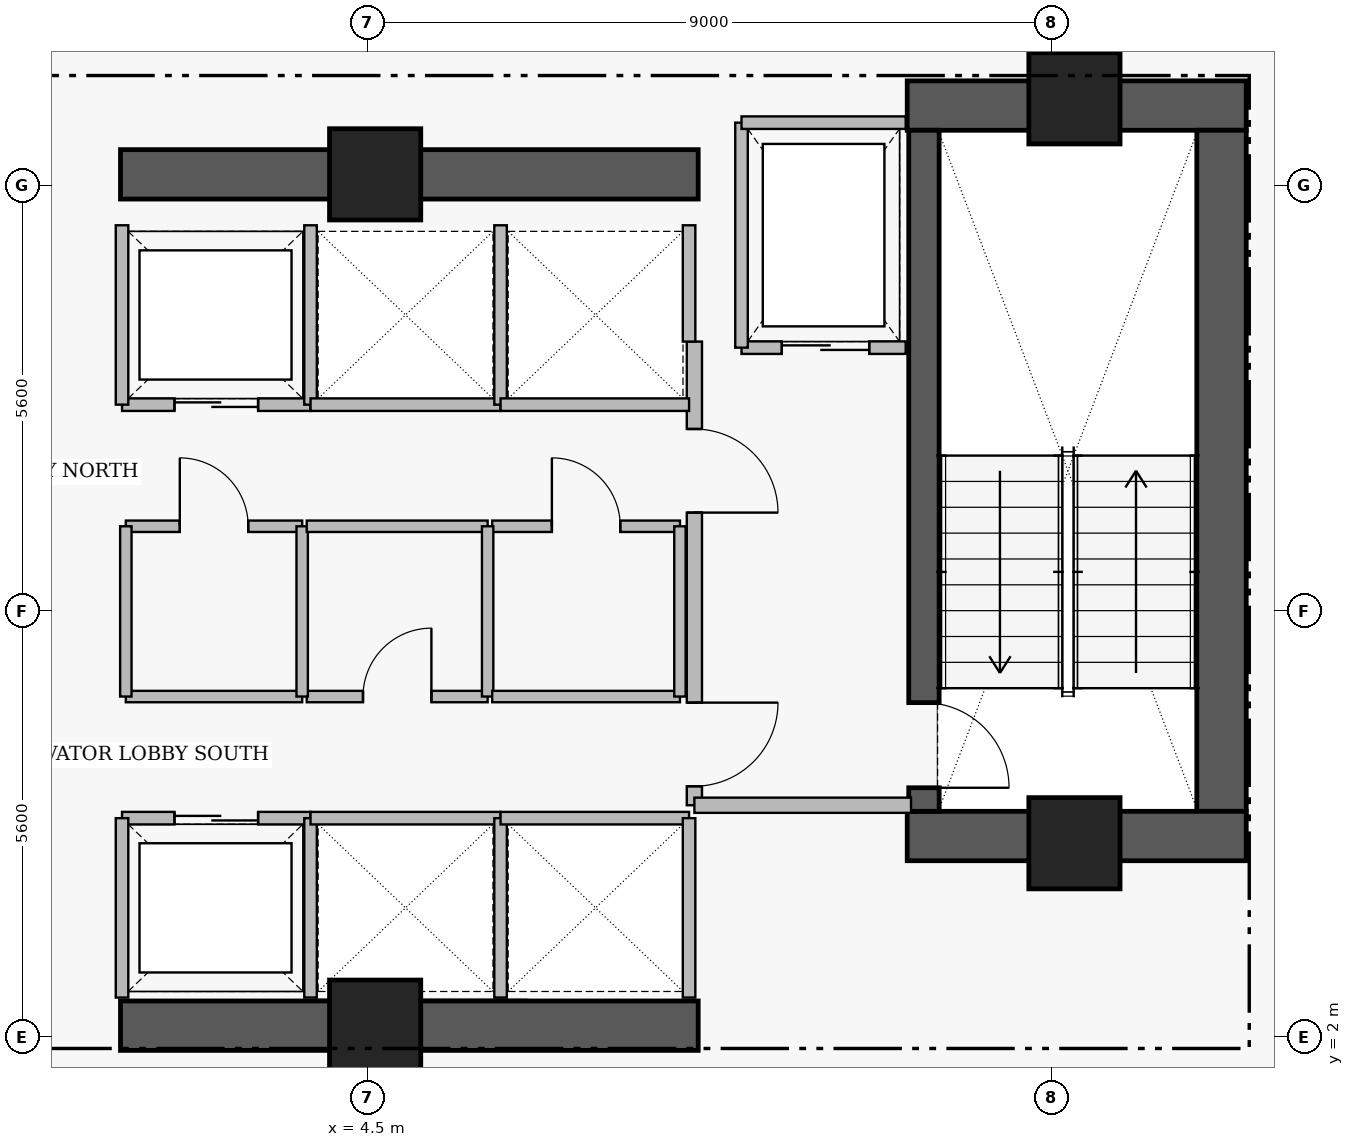
"""IFC4 building model, lengths in metres.
Left out: names, types, materials, properties, quantities, classifications, styles, units other than length and angle.
Written with IfcOpenShell. Run it as: python <this file> out.ifc"""

import sys

from ifc_helpers import new_model, si_unit, direction, frame, frame_2d, origin, origin_2d, place, context, subcontext, project, spatial, rectangle, extrude, element, fill, save


model = new_model("IFC4")
c1 = context("Model", 3, precision=1e-05, world=origin(), true_north=direction((0.0, 1.0)))
c2 = subcontext(c1, "Body", "Model", "MODEL_VIEW")
j1 = project(units=[si_unit("LENGTHUNIT", "METRE"), si_unit("PLANEANGLEUNIT", "RADIAN")], contexts=[c1])
p1 = place(None, origin())
s1 = spatial("IfcSite", under=j1, at=p1, CompositionType="ELEMENT")
p2 = place(p1, origin())
s2 = spatial("IfcBuilding", under=s1, at=p2, CompositionType="ELEMENT")
p3 = place(p2, frame((0.0, 0.0, 177.4)))
s3 = spatial("IfcBuildingStorey", under=s2, at=p3, CompositionType="ELEMENT", Elevation=177.4)
p4 = place(p3, frame((11.6, 14.255, 0.0), z_axis=(0.0, 0.0, 1.0), x_axis=(1.0, 0.0, 0.0)))
e1 = element("IfcWall", 1, at=p4, inside=s3, PredefinedType="SHEAR", context=c2, shape_type="SweptSolid", body=[
    extrude(rectangle(XDim=4.46, YDim=0.65, at=frame_2d((2.23, 0.0))), origin(), (0.0, 0.0, 1.0), 3.56),
])
p5 = place(p3, frame((15.735, 4.97, 0.0), z_axis=(0.0, 0.0, 1.0), x_axis=(0.0, 1.0, 0.0)))
e2 = element("IfcWall", 2, at=p5, inside=s3, PredefinedType="SHEAR", context=c2, shape_type="SweptSolid", body=[
    extrude(rectangle(XDim=8.96, YDim=0.65, at=frame_2d((4.48, 0.0))), origin(), (0.0, 0.0, 1.0), 3.56),
])
p6 = place(p3, frame((11.6, 4.645, 0.0), z_axis=(0.0, 0.0, 1.0), x_axis=(1.0, 0.0, 0.0)))
e3 = element("IfcWall", 3, at=p6, inside=s3, PredefinedType="SHEAR", context=c2, shape_type="SweptSolid", body=[
    extrude(rectangle(XDim=4.46, YDim=0.65, at=frame_2d((2.23, 0.0))), origin(), (0.0, 0.0, 1.0), 3.56),
])
for number, where, z_axis, x_axis in (
    (4, (1.25, 2.15, 0.0), (0.0, 0.0, 1.0), (1.0, 0.0, 0.0)),
    (5, (1.25, 13.35, 0.0), (0.0, 0.0, 1.0), (1.0, 0.0, 0.0)),
):
    element("IfcWall", number, at=place(p3, frame(where, z_axis=z_axis, x_axis=x_axis)), inside=s3, PredefinedType="SHEAR", context=c2, shape_type="SweptSolid", body=[
        extrude(rectangle(XDim=7.6, YDim=0.65, at=frame_2d((3.8, 0.0))), origin(), (0.0, 0.0, 1.0), 3.53),
    ])
p7 = place(p3, frame((11.82, 13.93, 0.0), z_axis=(0.0, 0.0, 1.0), x_axis=(0.0, -1.0, 0.0)))
e6 = element("IfcWall", 6, at=p7, inside=s3, PredefinedType="SHEAR", context=c2, shape_type="SweptSolid", body=[
    extrude(rectangle(XDim=8.96, YDim=0.4, at=frame_2d((4.48, 0.0))), origin(), (0.0, 0.0, 1.0), 3.56),
])
p8 = place(p7, frame((7.53, 0.0, 0.0)))
e7 = element("IfcOpeningElement", 7, at=p8, cuts=e6, PredefinedType="OPENING", context=c2, shape_type="SweptSolid", body=[
    extrude(rectangle(XDim=1.12, YDim=2.22, at=frame_2d((0.56, 1.11))), frame((0.0, 0.21, 0.0), z_axis=(0.0, -1.0, 0.0), x_axis=(1.0, 0.0, 0.0)), (0.0, 0.0, 1.0), 0.42),
])
for number, where, z_axis, x_axis in (
    (8, (4.6, 13.35, 0.0), (0.0, 0.0, 1.0), (1.0, 0.0, 0.0)),
    (9, (13.8, 14.35, 0.0), (0.0, 0.0, 1.0), (1.0, 0.0, 0.0)),
    (10, (4.6, 2.15, 0.0), (0.0, 0.0, 1.0), (1.0, 0.0, 0.0)),
    (11, (13.8, 4.55, 0.0), (0.0, 0.0, 1.0), (1.0, 0.0, 0.0)),
):
    element("IfcColumn", number, at=place(p3, frame(where, z_axis=z_axis, x_axis=x_axis)), inside=s3, PredefinedType="COLUMN", context=c2, shape_type="SweptSolid", body=[
        extrude(rectangle(XDim=1.2, YDim=1.2, at=origin_2d()), origin(), (0.0, 0.0, 1.0), 3.75),
    ])
p9 = place(p3, frame((8.8, 11.15, 0.0), z_axis=(0.0, 0.0, 1.0), x_axis=(0.0, -1.0, 0.0)))
e12 = element("IfcWall", 12, at=p9, inside=s3, PredefinedType="PARTITIONING", context=c2, shape_type="SweptSolid", body=[
    extrude(rectangle(XDim=6.1, YDim=0.2, at=frame_2d((3.05, 0.0))), origin(), (0.0, 0.0, 1.0), 3.53),
])
p10 = place(p9, frame((1.15, 0.0, 0.0)))
e13 = element("IfcOpeningElement", 13, at=p10, cuts=e12, PredefinedType="OPENING", context=c2, shape_type="SweptSolid", body=[
    extrude(rectangle(XDim=1.1, YDim=2.2, at=frame_2d((0.55, 1.1))), frame((0.0, 0.11, 0.0), z_axis=(0.0, -1.0, 0.0), x_axis=(1.0, 0.0, 0.0)), (0.0, 0.0, 1.0), 0.22),
])
p11 = place(p9, frame((4.75, 0.0, 0.0)))
e14 = element("IfcOpeningElement", 14, at=p11, cuts=e12, PredefinedType="OPENING", context=c2, shape_type="SweptSolid", body=[
    extrude(rectangle(XDim=1.1, YDim=2.2, at=frame_2d((0.55, 1.1))), frame((0.0, 0.11, 0.0), z_axis=(0.0, -1.0, 0.0), x_axis=(1.0, 0.0, 0.0)), (0.0, 0.0, 1.0), 0.22),
])
p12 = place(p3, frame((9.42, 11.07, 0.0), z_axis=(0.0, 0.0, 1.0), x_axis=(1.0, 0.0, 0.0)))
e15 = element("IfcWall", 15, at=p12, inside=s3, PredefinedType="PARTITIONING", context=c2, shape_type="SweptSolid", body=[
    extrude(rectangle(XDim=2.16, YDim=0.165, at=frame_2d((1.08, 0.0))), origin(), (0.0, 0.0, 1.0), 3.53),
])
p13 = place(p12, frame((0.53, 0.0, 0.0)))
e16 = element("IfcOpeningElement", 16, at=p13, cuts=e15, PredefinedType="OPENING", context=c2, shape_type="SweptSolid", body=[
    extrude(rectangle(XDim=1.15, YDim=2.25, at=frame_2d((0.575, 1.125))), frame((0.0, 0.093, 0.0), z_axis=(0.0, -1.0, 0.0), x_axis=(1.0, 0.0, 0.0)), (0.0, 0.0, 1.0), 0.185),
])
p14 = place(p3, frame((1.27, 4.88, 0.0), z_axis=(0.0, 0.0, 1.0), x_axis=(1.0, 0.0, 0.0)))
e17 = element("IfcWall", 17, at=p14, inside=s3, PredefinedType="PARTITIONING", context=c2, shape_type="SweptSolid", body=[
    extrude(rectangle(XDim=2.48, YDim=0.165, at=frame_2d((1.24, 0.0))), origin(), (0.0, 0.0, 1.0), 3.53),
])
p15 = place(p14, frame((0.69, 0.0, 0.0)))
e18 = element("IfcOpeningElement", 18, at=p15, cuts=e17, PredefinedType="OPENING", context=c2, shape_type="SweptSolid", body=[
    extrude(rectangle(XDim=1.1, YDim=2.25, at=frame_2d((0.55, 1.125))), frame((0.0, 0.093, 0.0), z_axis=(0.0, -1.0, 0.0), x_axis=(1.0, 0.0, 0.0)), (0.0, 0.0, 1.0), 0.185),
])
p16 = place(p3, frame((1.27, 10.32, 0.0), z_axis=(0.0, 0.0, 1.0), x_axis=(1.0, 0.0, 0.0)))
e19 = element("IfcWall", 19, at=p16, inside=s3, PredefinedType="PARTITIONING", context=c2, shape_type="SweptSolid", body=[
    extrude(rectangle(XDim=2.48, YDim=0.165, at=frame_2d((1.24, 0.0))), origin(), (0.0, 0.0, 1.0), 3.53),
])
p17 = place(p16, frame((0.69, 0.0, 0.0)))
e20 = element("IfcOpeningElement", 20, at=p17, cuts=e19, PredefinedType="OPENING", context=c2, shape_type="SweptSolid", body=[
    extrude(rectangle(XDim=1.1, YDim=2.25, at=frame_2d((0.55, 1.125))), frame((0.0, 0.093, 0.0), z_axis=(0.0, -1.0, 0.0), x_axis=(1.0, 0.0, 0.0)), (0.0, 0.0, 1.0), 0.185),
])
p18 = place(p3, frame((1.32, 8.72, 0.0), z_axis=(0.0, 0.0, 1.0), x_axis=(1.0, 0.0, 0.0)))
e21 = element("IfcWall", 21, at=p18, inside=s3, PredefinedType="PARTITIONING", context=c2, shape_type="SweptSolid", body=[
    extrude(rectangle(XDim=2.32, YDim=0.15, at=frame_2d((1.16, 0.0))), origin(), (0.0, 0.0, 1.0), 3.53),
])
p19 = place(p18, frame((0.71, 0.0, 0.0)))
e22 = element("IfcOpeningElement", 22, at=p19, cuts=e21, PredefinedType="OPENING", context=c2, shape_type="SweptSolid", body=[
    extrude(rectangle(XDim=0.9, YDim=2.15, at=frame_2d((0.45, 1.075))), frame((0.0, 0.085, 0.0), z_axis=(0.0, -1.0, 0.0), x_axis=(1.0, 0.0, 0.0)), (0.0, 0.0, 1.0), 0.17),
])
p20 = place(p3, frame((3.7, 6.48, 0.0), z_axis=(0.0, 0.0, 1.0), x_axis=(1.0, 0.0, 0.0)))
e23 = element("IfcWall", 23, at=p20, inside=s3, PredefinedType="PARTITIONING", context=c2, shape_type="SweptSolid", body=[
    extrude(rectangle(XDim=2.38, YDim=0.15, at=frame_2d((1.19, 0.0))), origin(), (0.0, 0.0, 1.0), 3.53),
])
p21 = place(p20, frame((0.74, 0.0, 0.0)))
e24 = element("IfcOpeningElement", 24, at=p21, cuts=e23, PredefinedType="OPENING", context=c2, shape_type="SweptSolid", body=[
    extrude(rectangle(XDim=0.9, YDim=2.15, at=frame_2d((0.45, 1.075))), frame((0.0, 0.085, 0.0), z_axis=(0.0, -1.0, 0.0), x_axis=(1.0, 0.0, 0.0)), (0.0, 0.0, 1.0), 0.17),
])
p22 = place(p3, frame((6.14, 8.72, 0.0), z_axis=(0.0, 0.0, 1.0), x_axis=(1.0, 0.0, 0.0)))
e25 = element("IfcWall", 25, at=p22, inside=s3, PredefinedType="PARTITIONING", context=c2, shape_type="SweptSolid", body=[
    extrude(rectangle(XDim=2.47, YDim=0.15, at=frame_2d((1.235, 0.0))), origin(), (0.0, 0.0, 1.0), 3.53),
])
p23 = place(p22, frame((0.785, 0.0, 0.0)))
e26 = element("IfcOpeningElement", 26, at=p23, cuts=e25, PredefinedType="OPENING", context=c2, shape_type="SweptSolid", body=[
    extrude(rectangle(XDim=0.9, YDim=2.15, at=frame_2d((0.45, 1.075))), frame((0.0, 0.085, 0.0), z_axis=(0.0, -1.0, 0.0), x_axis=(1.0, 0.0, 0.0)), (0.0, 0.0, 1.0), 0.17),
])
p24 = place(p3, frame((8.8, 5.05, 0.0), z_axis=(0.0, 0.0, 1.0), x_axis=(1.0, 0.0, 0.0)))
e27 = element("IfcWall", 27, at=p24, inside=s3, PredefinedType="PARTITIONING", context=c2, shape_type="SweptSolid", body=[
    extrude(rectangle(XDim=2.85, YDim=0.2, at=frame_2d((1.425, 0.0))), origin(), (0.0, 0.0, 1.0), 3.53),
])
p25 = place(p3, frame((9.42, 11.07, 0.0), z_axis=(0.0, 0.0, 1.0), x_axis=(0.0, 1.0, 0.0)))
e28 = element("IfcWall", 28, at=p25, inside=s3, PredefinedType="PARTITIONING", context=c2, shape_type="SweptSolid", body=[
    extrude(rectangle(XDim=2.96, YDim=0.165, at=frame_2d((1.48, 0.0))), origin(), (0.0, 0.0, 1.0), 3.53),
])
p26 = place(p3, frame((9.42, 14.03, 0.0), z_axis=(0.0, 0.0, 1.0), x_axis=(1.0, 0.0, 0.0)))
e29 = element("IfcWall", 29, at=p26, inside=s3, PredefinedType="PARTITIONING", context=c2, shape_type="SweptSolid", body=[
    extrude(rectangle(XDim=2.16, YDim=0.165, at=frame_2d((1.08, 0.0))), origin(), (0.0, 0.0, 1.0), 3.53),
])
for number, where, z_axis, x_axis in (
    (30, (1.27, 2.52, 0.0), (0.0, 0.0, 1.0), (0.0, 1.0, 0.0)),
    (31, (3.75, 2.52, 0.0), (0.0, 0.0, 1.0), (0.0, 1.0, 0.0)),
    (32, (1.27, 10.32, 0.0), (0.0, 0.0, 1.0), (0.0, 1.0, 0.0)),
    (33, (3.75, 10.32, 0.0), (0.0, 0.0, 1.0), (0.0, 1.0, 0.0)),
):
    element("IfcWall", number, at=place(p3, frame(where, z_axis=z_axis, x_axis=x_axis)), inside=s3, PredefinedType="PARTITIONING", context=c2, shape_type="SweptSolid", body=[
        extrude(rectangle(XDim=2.36, YDim=0.165, at=frame_2d((1.18, 0.0))), origin(), (0.0, 0.0, 1.0), 3.53),
    ])
p27 = place(p3, frame((3.75, 4.88, 0.0), z_axis=(0.0, 0.0, 1.0), x_axis=(1.0, 0.0, 0.0)))
e34 = element("IfcWall", 34, at=p27, inside=s3, PredefinedType="PARTITIONING", context=c2, shape_type="SweptSolid", body=[
    extrude(rectangle(XDim=2.5, YDim=0.165, at=frame_2d((1.25, 0.0))), origin(), (0.0, 0.0, 1.0), 3.53),
])
p28 = place(p3, frame((6.25, 2.52, 0.0), z_axis=(0.0, 0.0, 1.0), x_axis=(0.0, 1.0, 0.0)))
e35 = element("IfcWall", 35, at=p28, inside=s3, PredefinedType="PARTITIONING", context=c2, shape_type="SweptSolid", body=[
    extrude(rectangle(XDim=2.36, YDim=0.165, at=frame_2d((1.18, 0.0))), origin(), (0.0, 0.0, 1.0), 3.53),
])
p29 = place(p3, frame((6.25, 4.88, 0.0), z_axis=(0.0, 0.0, 1.0), x_axis=(1.0, 0.0, 0.0)))
e36 = element("IfcWall", 36, at=p29, inside=s3, PredefinedType="PARTITIONING", context=c2, shape_type="SweptSolid", body=[
    extrude(rectangle(XDim=2.48, YDim=0.165, at=frame_2d((1.24, 0.0))), origin(), (0.0, 0.0, 1.0), 3.53),
])
p30 = place(p3, frame((8.73, 2.52, 0.0), z_axis=(0.0, 0.0, 1.0), x_axis=(0.0, 1.0, 0.0)))
e37 = element("IfcWall", 37, at=p30, inside=s3, PredefinedType="PARTITIONING", context=c2, shape_type="SweptSolid", body=[
    extrude(rectangle(XDim=2.36, YDim=0.165, at=frame_2d((1.18, 0.0))), origin(), (0.0, 0.0, 1.0), 3.53),
])
p31 = place(p3, frame((3.75, 10.32, 0.0), z_axis=(0.0, 0.0, 1.0), x_axis=(1.0, 0.0, 0.0)))
e38 = element("IfcWall", 38, at=p31, inside=s3, PredefinedType="PARTITIONING", context=c2, shape_type="SweptSolid", body=[
    extrude(rectangle(XDim=2.5, YDim=0.165, at=frame_2d((1.25, 0.0))), origin(), (0.0, 0.0, 1.0), 3.53),
])
p32 = place(p3, frame((6.25, 10.32, 0.0), z_axis=(0.0, 0.0, 1.0), x_axis=(0.0, 1.0, 0.0)))
e39 = element("IfcWall", 39, at=p32, inside=s3, PredefinedType="PARTITIONING", context=c2, shape_type="SweptSolid", body=[
    extrude(rectangle(XDim=2.36, YDim=0.165, at=frame_2d((1.18, 0.0))), origin(), (0.0, 0.0, 1.0), 3.53),
])
p33 = place(p3, frame((6.25, 10.32, 0.0), z_axis=(0.0, 0.0, 1.0), x_axis=(1.0, 0.0, 0.0)))
e40 = element("IfcWall", 40, at=p33, inside=s3, PredefinedType="PARTITIONING", context=c2, shape_type="SweptSolid", body=[
    extrude(rectangle(XDim=2.48, YDim=0.165, at=frame_2d((1.24, 0.0))), origin(), (0.0, 0.0, 1.0), 3.53),
])
p34 = place(p3, frame((8.73, 11.15, 0.0), z_axis=(0.0, 0.0, 1.0), x_axis=(0.0, 1.0, 0.0)))
e41 = element("IfcWall", 41, at=p34, inside=s3, PredefinedType="PARTITIONING", context=c2, shape_type="SweptSolid", body=[
    extrude(rectangle(XDim=1.53, YDim=0.165, at=frame_2d((0.765, 0.0))), origin(), (0.0, 0.0, 1.0), 3.53),
])
p35 = place(p3, frame((1.32, 6.48, 0.0), z_axis=(0.0, 0.0, 1.0), x_axis=(1.0, 0.0, 0.0)))
e42 = element("IfcWall", 42, at=p35, inside=s3, PredefinedType="PARTITIONING", context=c2, shape_type="SweptSolid", body=[
    extrude(rectangle(XDim=2.32, YDim=0.15, at=frame_2d((1.16, 0.0))), origin(), (0.0, 0.0, 1.0), 3.53),
])
for number, where, z_axis, x_axis in (
    (43, (1.32, 6.48, 0.0), (0.0, 0.0, 1.0), (0.0, 1.0, 0.0)),
    (44, (3.64, 6.48, 0.0), (0.0, 0.0, 1.0), (0.0, 1.0, 0.0)),
):
    element("IfcWall", number, at=place(p3, frame(where, z_axis=z_axis, x_axis=x_axis)), inside=s3, PredefinedType="PARTITIONING", context=c2, shape_type="SweptSolid", body=[
        extrude(rectangle(XDim=2.24, YDim=0.15, at=frame_2d((1.12, 0.0))), origin(), (0.0, 0.0, 1.0), 3.53),
    ])
p36 = place(p3, frame((3.7, 8.72, 0.0), z_axis=(0.0, 0.0, 1.0), x_axis=(1.0, 0.0, 0.0)))
e45 = element("IfcWall", 45, at=p36, inside=s3, PredefinedType="PARTITIONING", context=c2, shape_type="SweptSolid", body=[
    extrude(rectangle(XDim=2.38, YDim=0.15, at=frame_2d((1.19, 0.0))), origin(), (0.0, 0.0, 1.0), 3.53),
])
p37 = place(p3, frame((6.08, 6.48, 0.0), z_axis=(0.0, 0.0, 1.0), x_axis=(0.0, 1.0, 0.0)))
e46 = element("IfcWall", 46, at=p37, inside=s3, PredefinedType="PARTITIONING", context=c2, shape_type="SweptSolid", body=[
    extrude(rectangle(XDim=2.24, YDim=0.15, at=frame_2d((1.12, 0.0))), origin(), (0.0, 0.0, 1.0), 3.53),
])
p38 = place(p3, frame((6.14, 6.48, 0.0), z_axis=(0.0, 0.0, 1.0), x_axis=(1.0, 0.0, 0.0)))
e47 = element("IfcWall", 47, at=p38, inside=s3, PredefinedType="PARTITIONING", context=c2, shape_type="SweptSolid", body=[
    extrude(rectangle(XDim=2.47, YDim=0.15, at=frame_2d((1.235, 0.0))), origin(), (0.0, 0.0, 1.0), 3.53),
])
p39 = place(p3, frame((8.61, 6.48, 0.0), z_axis=(0.0, 0.0, 1.0), x_axis=(0.0, 1.0, 0.0)))
e48 = element("IfcWall", 48, at=p39, inside=s3, PredefinedType="PARTITIONING", context=c2, shape_type="SweptSolid", body=[
    extrude(rectangle(XDim=2.24, YDim=0.15, at=frame_2d((1.12, 0.0))), origin(), (0.0, 0.0, 1.0), 3.53),
])
p40 = place(p8, origin())
e49 = element("IfcDoor", 49, at=p40, inside=s3, OperationType="SINGLE_SWING_RIGHT", PredefinedType="DOOR", context=c2, shape_type="SweptSolid", body=[
    extrude(rectangle(XDim=1.12, YDim=2.22, at=frame_2d((0.56, 1.11))), frame((0.0, 0.025, 0.0), z_axis=(0.0, -1.0, 0.0), x_axis=(1.0, 0.0, 0.0)), (0.0, 0.0, 1.0), 0.05),
])
fill(e7, e49)
p41 = place(p10, origin())
e50 = element("IfcDoor", 50, at=p41, inside=s3, OperationType="SINGLE_SWING_RIGHT", PredefinedType="DOOR", context=c2, shape_type="SweptSolid", body=[
    extrude(rectangle(XDim=1.1, YDim=2.2, at=frame_2d((0.55, 1.1))), frame((0.0, 0.025, 0.0), z_axis=(0.0, -1.0, 0.0), x_axis=(1.0, 0.0, 0.0)), (0.0, 0.0, 1.0), 0.05),
])
fill(e13, e50)
p42 = place(p11, origin())
e51 = element("IfcDoor", 51, at=p42, inside=s3, OperationType="SINGLE_SWING_LEFT", PredefinedType="DOOR", context=c2, shape_type="SweptSolid", body=[
    extrude(rectangle(XDim=1.1, YDim=2.2, at=frame_2d((0.55, 1.1))), frame((0.0, 0.025, 0.0), z_axis=(0.0, -1.0, 0.0), x_axis=(1.0, 0.0, 0.0)), (0.0, 0.0, 1.0), 0.05),
])
fill(e14, e51)
p43 = place(p13, origin())
e52 = element("IfcDoor", 52, at=p43, inside=s3, OperationType="SLIDING_TO_LEFT", PredefinedType="DOOR", context=c2, shape_type="SweptSolid", body=[
    extrude(rectangle(XDim=1.15, YDim=2.25, at=frame_2d((0.575, 1.125))), frame((0.0, 0.025, 0.0), z_axis=(0.0, -1.0, 0.0), x_axis=(1.0, 0.0, 0.0)), (0.0, 0.0, 1.0), 0.05),
])
fill(e16, e52)
p44 = place(p15, origin())
e53 = element("IfcDoor", 53, at=p44, inside=s3, OperationType="SLIDING_TO_LEFT", PredefinedType="DOOR", context=c2, shape_type="SweptSolid", body=[
    extrude(rectangle(XDim=1.1, YDim=2.25, at=frame_2d((0.55, 1.125))), frame((0.0, 0.025, 0.0), z_axis=(0.0, -1.0, 0.0), x_axis=(1.0, 0.0, 0.0)), (0.0, 0.0, 1.0), 0.05),
])
fill(e18, e53)
p45 = place(p17, origin())
e54 = element("IfcDoor", 54, at=p45, inside=s3, OperationType="SLIDING_TO_LEFT", PredefinedType="DOOR", context=c2, shape_type="SweptSolid", body=[
    extrude(rectangle(XDim=1.1, YDim=2.25, at=frame_2d((0.55, 1.125))), frame((0.0, 0.025, 0.0), z_axis=(0.0, -1.0, 0.0), x_axis=(1.0, 0.0, 0.0)), (0.0, 0.0, 1.0), 0.05),
])
fill(e20, e54)
p46 = place(p19, origin())
e55 = element("IfcDoor", 55, at=p46, inside=s3, OperationType="SINGLE_SWING_LEFT", PredefinedType="DOOR", context=c2, shape_type="SweptSolid", body=[
    extrude(rectangle(XDim=0.9, YDim=2.15, at=frame_2d((0.45, 1.075))), frame((0.0, 0.025, 0.0), z_axis=(0.0, -1.0, 0.0), x_axis=(1.0, 0.0, 0.0)), (0.0, 0.0, 1.0), 0.05),
])
fill(e22, e55)
p47 = place(p21, origin())
e56 = element("IfcDoor", 56, at=p47, inside=s3, OperationType="SINGLE_SWING_RIGHT", PredefinedType="DOOR", context=c2, shape_type="SweptSolid", body=[
    extrude(rectangle(XDim=0.9, YDim=2.15, at=frame_2d((0.45, 1.075))), frame((0.0, 0.025, 0.0), z_axis=(0.0, -1.0, 0.0), x_axis=(1.0, 0.0, 0.0)), (0.0, 0.0, 1.0), 0.05),
])
fill(e24, e56)
p48 = place(p23, origin())
e57 = element("IfcDoor", 57, at=p48, inside=s3, OperationType="SINGLE_SWING_LEFT", PredefinedType="DOOR", context=c2, shape_type="SweptSolid", body=[
    extrude(rectangle(XDim=0.9, YDim=2.15, at=frame_2d((0.45, 1.075))), frame((0.0, 0.025, 0.0), z_axis=(0.0, -1.0, 0.0), x_axis=(1.0, 0.0, 0.0)), (0.0, 0.0, 1.0), 0.05),
])
fill(e26, e57)
save(model, sys.argv[1])
